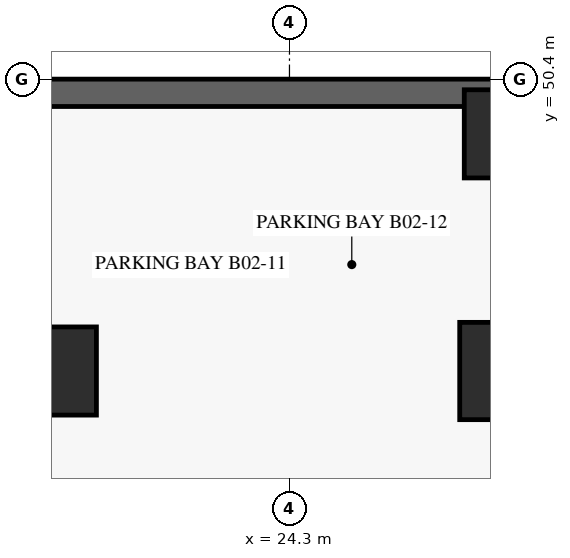
"""IFC4 building model, lengths in metres.
Left out: names, types, materials, properties, quantities, classifications, styles, units other than length and angle.
Written with IfcOpenShell. Run it as: python <this file> out.ifc"""

import sys

from ifc_helpers import new_model, si_unit, direction, frame, frame_2d, origin, origin_2d, place, context, subcontext, project, spatial, rectangle, extrude, source, transform, mapped, element, save


model = new_model("IFC4")
c1 = context("Model", 3, precision=1e-05, world=origin(), true_north=direction((0.0, 1.0)))
c2 = subcontext(c1, "Body", "Model", "MODEL_VIEW")
j1 = project(units=[si_unit("LENGTHUNIT", "METRE"), si_unit("PLANEANGLEUNIT", "RADIAN")], contexts=[c1])
p1 = place(None, origin())
s1 = spatial("IfcSite", under=j1, at=p1, CompositionType="ELEMENT")
p2 = place(p1, origin())
s2 = spatial("IfcBuilding", under=s1, at=p2, CompositionType="ELEMENT")
p3 = place(p2, frame((0.0, 0.0, -7.2)))
s3 = spatial("IfcBuildingStorey", under=s2, at=p3, CompositionType="ELEMENT", Elevation=-7.2)
p4 = place(p3, frame((64.575, 50.175, -0.36), z_axis=(0.0, 0.0, 1.0), x_axis=(-1.0, 0.0, 0.0)))
e1 = element("IfcWall", 1, at=p4, inside=s3, PredefinedType="USERDEFINED", context=c2, shape_type="SweptSolid", body=[
    extrude(rectangle(XDim=64.35, YDim=0.45, at=frame_2d((32.175, 0.0))), origin(), (0.0, 0.0, 1.0), 3.598),
])
m1 = source(origin(), c2, "Body", "SweptSolid", [
    extrude(rectangle(XDim=1.45, YDim=1.45, at=origin_2d()), origin(), (0.0, 0.0, 1.0), 3.6),
])
p5 = place(p3, frame((20.4, 45.6, -0.36), z_axis=(0.0, 0.0, 1.0), x_axis=(1.0, 0.0, 0.0)))
e2 = element("IfcColumn", 2, at=p5, inside=s3, PredefinedType="COLUMN", context=c2, shape_type="MappedRepresentation", body=[
    mapped(m1, transform((0.0, 0.0, 0.0), scale=1.0)),
])
m2 = source(origin(), c2, "Body", "SweptSolid", [
    extrude(rectangle(XDim=1.6, YDim=1.6, at=origin_2d()), origin(), (0.0, 0.0, 1.0), 3.6),
])
p6 = place(p3, frame((27.9, 45.6, -0.36), z_axis=(0.0, 0.0, 1.0), x_axis=(1.0, 0.0, 0.0)))
e3 = element("IfcColumn", 3, at=p6, inside=s3, PredefinedType="COLUMN", context=c2, shape_type="MappedRepresentation", body=[
    mapped(m2, transform((0.0, 0.0, 0.0), scale=1.0)),
])
p7 = place(p3, frame((27.9, 49.5, -0.36), z_axis=(0.0, 0.0, 1.0), x_axis=(1.0, 0.0, 0.0)))
e4 = element("IfcColumn", 4, at=p7, inside=s3, PredefinedType="COLUMN", context=c2, shape_type="MappedRepresentation", body=[
    mapped(m1, transform((0.0, 0.0, 0.0), scale=1.0)),
])
save(model, sys.argv[1])
